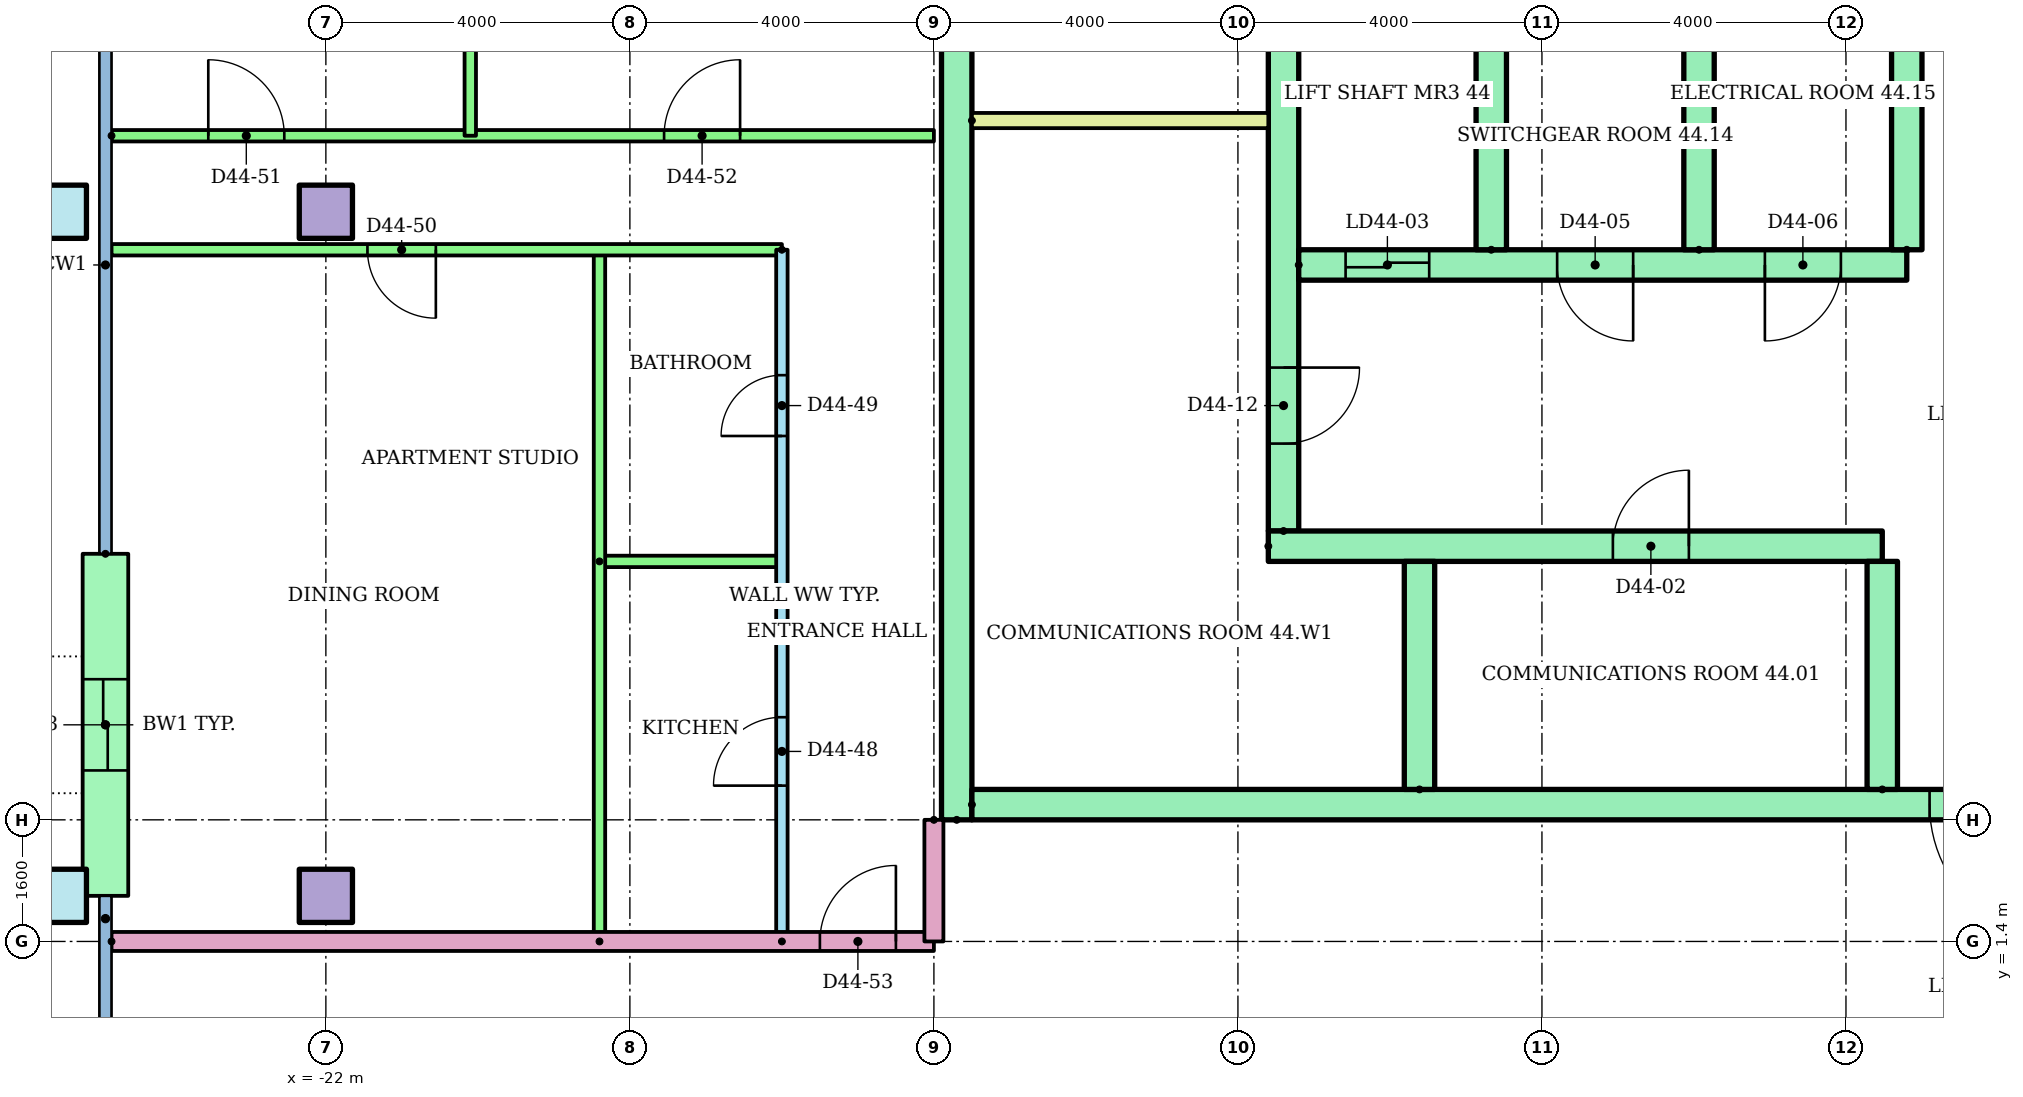
"""IFC4 building model, lengths in metres.
Left out: names, types, materials, properties, quantities, classifications, styles, units other than length and angle.
Written with IfcOpenShell. Run it as: python <this file> out.ifc"""

import sys

from ifc_helpers import new_model, si_unit, direction, frame, frame_2d, origin, origin_2d, place, context, subcontext, project, spatial, rectangle, hollow_rectangle, extrude, element, fill, save


model = new_model("IFC4")
c1 = context("Model", 3, precision=1e-05, world=origin(), true_north=direction((0.0, 1.0)))
c2 = subcontext(c1, "Body", "Model", "MODEL_VIEW")
j1 = project(units=[si_unit("LENGTHUNIT", "METRE"), si_unit("PLANEANGLEUNIT", "RADIAN")], contexts=[c1])
p1 = place(None, origin())
s1 = spatial("IfcSite", under=j1, at=p1, CompositionType="ELEMENT")
p2 = place(p1, origin())
s2 = spatial("IfcBuilding", under=s1, at=p2, CompositionType="ELEMENT")
p3 = place(p2, frame((0.0, 0.0, 171.7)))
s3 = spatial("IfcBuildingStorey", under=s2, at=p3, CompositionType="ELEMENT", Elevation=171.7)
p4 = place(p3, frame((-25.5, 2.0, 0.0)))
e1 = element("IfcColumn", 1, at=p4, inside=s3, PredefinedType="COLUMN", context=c2, shape_type="SweptSolid", body=[
    extrude(hollow_rectangle(XDim=0.7, YDim=0.7, WallThickness=0.036, at=origin_2d()), origin(), (0.0, 0.0, 1.0), 3.2),
])
p5 = place(p3, frame((-22.0, 2.0, 0.0)))
e2 = element("IfcColumn", 2, at=p5, inside=s3, PredefinedType="COLUMN", context=c2, shape_type="SweptSolid", body=[
    extrude(rectangle(XDim=0.7, YDim=0.7, at=origin_2d()), origin(), (0.0, 0.0, 1.0), 3.2),
])
p6 = place(p3, frame((-25.5, 11.0, 0.0)))
e3 = element("IfcColumn", 3, at=p6, inside=s3, PredefinedType="COLUMN", context=c2, shape_type="SweptSolid", body=[
    extrude(hollow_rectangle(XDim=0.7, YDim=0.7, WallThickness=0.036, at=origin_2d()), origin(), (0.0, 0.0, 1.0), 3.2),
])
p7 = place(p3, frame((-22.0, 11.0, 0.0)))
e4 = element("IfcColumn", 4, at=p7, inside=s3, PredefinedType="COLUMN", context=c2, shape_type="SweptSolid", body=[
    extrude(rectangle(XDim=0.7, YDim=0.7, at=origin_2d()), origin(), (0.0, 0.0, 1.0), 3.2),
])
p8 = place(p3, frame((-24.9, 6.5, 0.0), z_axis=(0.0, 0.0, 1.0), x_axis=(0.0, -1.0, 0.0)))
e5 = element("IfcWall", 5, at=p8, inside=s3, PredefinedType="STANDARD", context=c2, shape_type="SweptSolid", body=[
    extrude(rectangle(XDim=4.5, YDim=0.6, at=frame_2d((2.25, 0.0))), origin(), (0.0, 0.0, 1.0), 2.92),
])
p9 = place(p8, frame((1.65, 0.0, 0.0)))
e6 = element("IfcOpeningElement", 6, at=p9, cuts=e5, PredefinedType="OPENING", context=c2, shape_type="SweptSolid", body=[
    extrude(rectangle(XDim=1.2, YDim=2.1, at=frame_2d((0.6, 1.05))), frame((0.0, 0.31, 0.0), z_axis=(0.0, -1.0, 0.0), x_axis=(1.0, 0.0, 0.0)), (0.0, 0.0, 1.0), 0.62),
])
p10 = place(p3, frame((-13.7, 3.0, 0.0), z_axis=(0.0, 0.0, 1.0), x_axis=(0.0, 1.0, 0.0)))
e7 = element("IfcWall", 7, at=p10, inside=s3, PredefinedType="SHEAR", context=c2, shape_type="SweptSolid", body=[
    extrude(rectangle(XDim=17.0, YDim=0.4, at=frame_2d((8.5, 0.0))), origin(), (0.0, 0.0, 1.0), 2.92),
])
p11 = place(p3, frame((-9.4, 6.8, 0.0), z_axis=(0.0, 0.0, 1.0), x_axis=(0.0, 1.0, 0.0)))
e8 = element("IfcWall", 8, at=p11, inside=s3, PredefinedType="SHEAR", context=c2, shape_type="SweptSolid", body=[
    extrude(rectangle(XDim=12.7, YDim=0.4, at=frame_2d((6.35, 0.0))), origin(), (0.0, 0.0, 1.0), 2.92),
])
p12 = place(p11, frame((1.15, 0.0, 0.0)))
e9 = element("IfcOpeningElement", 9, at=p12, cuts=e8, PredefinedType="OPENING", context=c2, shape_type="SweptSolid", body=[
    extrude(rectangle(XDim=1.0, YDim=2.1, at=frame_2d((0.5, 1.05))), frame((0.0, 0.21, 0.0), z_axis=(0.0, -1.0, 0.0), x_axis=(1.0, 0.0, 0.0)), (0.0, 0.0, 1.0), 0.42),
])
p13 = place(p11, frame((7.925, 0.0, 0.0)))
e10 = element("IfcOpeningElement", 10, at=p13, cuts=e8, PredefinedType="OPENING", context=c2, shape_type="SweptSolid", body=[
    extrude(rectangle(XDim=1.0, YDim=2.1, at=frame_2d((0.5, 1.05))), frame((0.0, 0.21, 0.0), z_axis=(0.0, -1.0, 0.0), x_axis=(1.0, 0.0, 0.0)), (0.0, 0.0, 1.0), 0.42),
])
p14 = place(p3, frame((-13.5, 3.2, 0.0)))
e11 = element("IfcWall", 11, at=p14, inside=s3, PredefinedType="SHEAR", context=c2, shape_type="SweptSolid", body=[
    extrude(rectangle(XDim=27.0, YDim=0.4, at=frame_2d((13.5, 0.0))), origin(), (0.0, 0.0, 1.0), 2.92),
])
p15 = place(p14, frame((22.083, 0.0, 0.0)))
e12 = element("IfcOpeningElement", 12, at=p15, cuts=e11, PredefinedType="OPENING", context=c2, shape_type="SweptSolid", body=[
    extrude(rectangle(XDim=1.1, YDim=2.1, at=frame_2d((0.55, 1.05))), frame((0.0, 0.21, 0.0), z_axis=(0.0, -1.0, 0.0), x_axis=(1.0, 0.0, 0.0)), (0.0, 0.0, 1.0), 0.42),
])
p16 = place(p14, frame((25.128, 0.0, 0.0)))
e13 = element("IfcOpeningElement", 13, at=p16, cuts=e11, PredefinedType="OPENING", context=c2, shape_type="SweptSolid", body=[
    extrude(rectangle(XDim=1.1, YDim=2.1, at=frame_2d((0.55, 1.05))), frame((0.0, 0.21, 0.0), z_axis=(0.0, -1.0, 0.0), x_axis=(1.0, 0.0, 0.0)), (0.0, 0.0, 1.0), 0.42),
])
p17 = place(p14, frame((12.6, 0.0, 0.0)))
e14 = element("IfcOpeningElement", 14, at=p17, cuts=e11, PredefinedType="OPENING", context=c2, shape_type="SweptSolid", body=[
    extrude(rectangle(XDim=1.8, YDim=2.1, at=frame_2d((0.9, 1.05))), frame((0.0, 0.21, 0.0), z_axis=(0.0, -1.0, 0.0), x_axis=(1.0, 0.0, 0.0)), (0.0, 0.0, 1.0), 0.42),
])
p18 = place(p3, frame((-9.6, 6.6, 0.0)))
e15 = element("IfcWall", 15, at=p18, inside=s3, PredefinedType="SHEAR", context=c2, shape_type="SweptSolid", body=[
    extrude(rectangle(XDim=8.078, YDim=0.4, at=frame_2d((4.039, 0.0))), origin(), (0.0, 0.0, 1.0), 2.92),
])
p19 = place(p18, frame((4.533, 0.0, 0.0)))
e16 = element("IfcOpeningElement", 16, at=p19, cuts=e15, PredefinedType="OPENING", context=c2, shape_type="SweptSolid", body=[
    extrude(rectangle(XDim=1.0, YDim=2.1, at=frame_2d((0.5, 1.05))), frame((0.0, 0.21, 0.0), z_axis=(0.0, -1.0, 0.0), x_axis=(1.0, 0.0, 0.0)), (0.0, 0.0, 1.0), 0.42),
])
for number, where, z_axis, x_axis in (
    (17, (-7.611, 3.4, 0.0), (0.0, 0.0, 1.0), (0.0, 1.0, 0.0)),
    (18, (-1.522, 3.4, 0.0), (0.0, 0.0, 1.0), (0.0, 1.0, 0.0)),
):
    element("IfcWall", number, at=place(p3, frame(where, z_axis=z_axis, x_axis=x_axis)), inside=s3, PredefinedType="SHEAR", context=c2, shape_type="SweptSolid", body=[
        extrude(rectangle(XDim=3.0, YDim=0.4, at=frame_2d((1.5, 0.0))), origin(), (0.0, 0.0, 1.0), 2.92),
    ])
p20 = place(p3, frame((-9.2, 10.3, 0.0)))
e19 = element("IfcWall", 19, at=p20, inside=s3, PredefinedType="SHEAR", context=c2, shape_type="SweptSolid", body=[
    extrude(rectangle(XDim=8.0, YDim=0.4, at=frame_2d((4.0, 0.0))), origin(), (0.0, 0.0, 1.0), 2.92),
])
p21 = place(p20, frame((0.617, 0.0, 0.0)))
e20 = element("IfcOpeningElement", 20, at=p21, cuts=e19, PredefinedType="OPENING", context=c2, shape_type="SweptSolid", body=[
    extrude(rectangle(XDim=1.1, YDim=2.1, at=frame_2d((0.55, 1.05))), frame((0.0, 0.21, 0.0), z_axis=(0.0, -1.0, 0.0), x_axis=(1.0, 0.0, 0.0)), (0.0, 0.0, 1.0), 0.42),
])
p22 = place(p20, frame((3.4, 0.0, 0.0)))
e21 = element("IfcOpeningElement", 21, at=p22, cuts=e19, PredefinedType="OPENING", context=c2, shape_type="SweptSolid", body=[
    extrude(rectangle(XDim=1.0, YDim=2.1, at=frame_2d((0.5, 1.05))), frame((0.0, 0.21, 0.0), z_axis=(0.0, -1.0, 0.0), x_axis=(1.0, 0.0, 0.0)), (0.0, 0.0, 1.0), 0.42),
])
p23 = place(p20, frame((6.133, 0.0, 0.0)))
e22 = element("IfcOpeningElement", 22, at=p23, cuts=e19, PredefinedType="OPENING", context=c2, shape_type="SweptSolid", body=[
    extrude(rectangle(XDim=1.0, YDim=2.1, at=frame_2d((0.5, 1.05))), frame((0.0, 0.21, 0.0), z_axis=(0.0, -1.0, 0.0), x_axis=(1.0, 0.0, 0.0)), (0.0, 0.0, 1.0), 0.42),
])
for number, where, z_axis, x_axis in (
    (23, (-6.667, 10.5, 0.0), (0.0, 0.0, 1.0), (0.0, 1.0, 0.0)),
    (24, (-3.933, 10.5, 0.0), (0.0, 0.0, 1.0), (0.0, 1.0, 0.0)),
    (25, (-1.2, 10.5, 0.0), (0.0, 0.0, 1.0), (0.0, 1.0, 0.0)),
):
    element("IfcWall", number, at=place(p3, frame(where, z_axis=z_axis, x_axis=x_axis)), inside=s3, PredefinedType="SHEAR", context=c2, shape_type="SweptSolid", body=[
        extrude(rectangle(XDim=3.0, YDim=0.4, at=frame_2d((1.5, 0.0))), origin(), (0.0, 0.0, 1.0), 2.92),
    ])
p24 = place(p3, frame((-13.5, 12.2, 0.0)))
e26 = element("IfcWall", 26, at=p24, inside=s3, PredefinedType="PARTITIONING", context=c2, shape_type="SweptSolid", body=[
    extrude(rectangle(XDim=3.9, YDim=0.2, at=frame_2d((1.95, 0.0))), origin(), (0.0, 0.0, 1.0), 2.92),
])
p25 = place(p3, frame((-16.0, 1.4, 0.0), z_axis=(0.0, 0.0, 1.0), x_axis=(0.0, 1.0, 0.0)))
e27 = element("IfcWall", 27, at=p25, inside=s3, PredefinedType="PARTITIONING", context=c2, shape_type="SweptSolid", body=[
    extrude(rectangle(XDim=9.1, YDim=0.15, at=frame_2d((4.55, 0.0))), origin(), (0.0, 0.0, 1.0), 2.4),
])
p26 = place(p25, frame((2.05, 0.0, 0.0)))
e28 = element("IfcOpeningElement", 28, at=p26, cuts=e27, PredefinedType="OPENING", context=c2, shape_type="SweptSolid", body=[
    extrude(rectangle(XDim=0.9, YDim=2.1, at=frame_2d((0.45, 1.05))), frame((0.0, 0.085, 0.0), z_axis=(0.0, -1.0, 0.0), x_axis=(1.0, 0.0, 0.0)), (0.0, 0.0, 1.0), 0.17),
])
p27 = place(p25, frame((6.65, 0.0, 0.0)))
e29 = element("IfcOpeningElement", 29, at=p27, cuts=e27, PredefinedType="OPENING", context=c2, shape_type="SweptSolid", body=[
    extrude(rectangle(XDim=0.8, YDim=2.1, at=frame_2d((0.4, 1.05))), frame((0.0, 0.085, 0.0), z_axis=(0.0, -1.0, 0.0), x_axis=(1.0, 0.0, 0.0)), (0.0, 0.0, 1.0), 0.17),
])
p28 = place(p3, frame((-18.4, 6.4, 0.0)))
e30 = element("IfcWall", 30, at=p28, inside=s3, PredefinedType="PARTITIONING", context=c2, shape_type="SweptSolid", body=[
    extrude(rectangle(XDim=2.4, YDim=0.15, at=frame_2d((1.2, 0.0))), origin(), (0.0, 0.0, 1.0), 2.4),
])
p29 = place(p3, frame((-18.4, 1.4, 0.0), z_axis=(0.0, 0.0, 1.0), x_axis=(0.0, 1.0, 0.0)))
e31 = element("IfcWall", 31, at=p29, inside=s3, PredefinedType="PARTITIONING", context=c2, shape_type="SweptSolid", body=[
    extrude(rectangle(XDim=9.1, YDim=0.15, at=frame_2d((4.55, 0.0))), origin(), (0.0, 0.0, 1.0), 2.4),
])
p30 = place(p3, frame((-16.0, 10.5, 0.0), z_axis=(0.0, 0.0, 1.0), x_axis=(-1.0, 0.0, 0.0)))
e32 = element("IfcWall", 32, at=p30, inside=s3, PredefinedType="PARTITIONING", context=c2, shape_type="SweptSolid", body=[
    extrude(rectangle(XDim=8.82, YDim=0.15, at=frame_2d((4.41, 0.0))), origin(), (0.0, 0.0, 1.0), 2.4),
])
p31 = place(p30, frame((4.553, 0.0, 0.0)))
e33 = element("IfcOpeningElement", 33, at=p31, cuts=e32, PredefinedType="OPENING", context=c2, shape_type="SweptSolid", body=[
    extrude(rectangle(XDim=0.9, YDim=2.1, at=frame_2d((0.45, 1.05))), frame((0.0, 0.085, 0.0), z_axis=(0.0, -1.0, 0.0), x_axis=(1.0, 0.0, 0.0)), (0.0, 0.0, 1.0), 0.17),
])
p32 = place(p3, frame((-24.82, 12.0, 0.0)))
e34 = element("IfcWall", 34, at=p32, inside=s3, PredefinedType="PARTITIONING", context=c2, shape_type="SweptSolid", body=[
    extrude(rectangle(XDim=10.82, YDim=0.15, at=frame_2d((5.41, 0.0))), origin(), (0.0, 0.0, 1.0), 2.4),
])
p33 = place(p32, frame((1.273, 0.0, 0.0)))
e35 = element("IfcOpeningElement", 35, at=p33, cuts=e34, PredefinedType="OPENING", context=c2, shape_type="SweptSolid", body=[
    extrude(rectangle(XDim=1.0, YDim=2.1, at=frame_2d((0.5, 1.05))), frame((0.0, 0.085, 0.0), z_axis=(0.0, -1.0, 0.0), x_axis=(1.0, 0.0, 0.0)), (0.0, 0.0, 1.0), 0.17),
])
p34 = place(p32, frame((7.27, 0.0, 0.0)))
e36 = element("IfcOpeningElement", 36, at=p34, cuts=e34, PredefinedType="OPENING", context=c2, shape_type="SweptSolid", body=[
    extrude(rectangle(XDim=1.0, YDim=2.1, at=frame_2d((0.5, 1.05))), frame((0.0, 0.085, 0.0), z_axis=(0.0, -1.0, 0.0), x_axis=(1.0, 0.0, 0.0)), (0.0, 0.0, 1.0), 0.17),
])
p35 = place(p3, frame((-20.1, 17.02, 0.0), z_axis=(0.0, 0.0, 1.0), x_axis=(0.0, -1.0, 0.0)))
e37 = element("IfcWall", 37, at=p35, inside=s3, PredefinedType="PARTITIONING", context=c2, shape_type="SweptSolid", body=[
    extrude(rectangle(XDim=5.02, YDim=0.15, at=frame_2d((2.51, 0.0))), origin(), (0.0, 0.0, 1.0), 2.4),
])
p36 = place(p3, frame((-24.82, 1.4, 0.0)))
e38 = element("IfcWall", 38, at=p36, inside=s3, PredefinedType="PARTITIONING", context=c2, shape_type="SweptSolid", body=[
    extrude(rectangle(XDim=10.82, YDim=0.25, at=frame_2d((5.41, 0.0))), origin(), (0.0, 0.0, 1.0), 2.4),
])
p37 = place(p36, frame((9.32, 0.0, 0.0)))
e39 = element("IfcOpeningElement", 39, at=p37, cuts=e38, PredefinedType="OPENING", context=c2, shape_type="SweptSolid", body=[
    extrude(rectangle(XDim=1.0, YDim=2.1, at=frame_2d((0.5, 1.05))), frame((0.0, 0.135, 0.0), z_axis=(0.0, -1.0, 0.0), x_axis=(1.0, 0.0, 0.0)), (0.0, 0.0, 1.0), 0.27),
])
p38 = place(p3, frame((-14.0, 3.0, 0.0), z_axis=(0.0, 0.0, 1.0), x_axis=(0.0, -1.0, 0.0)))
e40 = element("IfcWall", 40, at=p38, inside=s3, PredefinedType="PARTITIONING", context=c2, shape_type="SweptSolid", body=[
    extrude(rectangle(XDim=1.6, YDim=0.25, at=frame_2d((0.8, 0.0))), origin(), (0.0, 0.0, 1.0), 2.4),
])
p39 = place(p17, frame((1.8, 0.0, 0.0), z_axis=(0.0, 0.0, 1.0), x_axis=(-1.0, 0.0, 0.0)))
e41 = element("IfcDoor", 41, at=p39, inside=s3, OperationType="DOUBLE_DOOR_SINGLE_SWING", PredefinedType="DOOR", context=c2, shape_type="SweptSolid", body=[
    extrude(rectangle(XDim=1.8, YDim=2.1, at=frame_2d((0.9, 1.05))), frame((0.0, 0.025, 0.0), z_axis=(0.0, -1.0, 0.0), x_axis=(1.0, 0.0, 0.0)), (0.0, 0.0, 1.0), 0.05),
])
fill(e14, e41)
p40 = place(p19, origin())
e42 = element("IfcDoor", 42, at=p40, inside=s3, OperationType="SINGLE_SWING_RIGHT", PredefinedType="DOOR", context=c2, shape_type="SweptSolid", body=[
    extrude(rectangle(XDim=1.0, YDim=2.1, at=frame_2d((0.5, 1.05))), frame((0.0, 0.025, 0.0), z_axis=(0.0, -1.0, 0.0), x_axis=(1.0, 0.0, 0.0)), (0.0, 0.0, 1.0), 0.05),
])
fill(e16, e42)
p41 = place(p21, origin())
e43 = element("IfcDoor", 43, at=p41, inside=s3, OperationType="SLIDING_TO_LEFT", PredefinedType="DOOR", context=c2, shape_type="SweptSolid", body=[
    extrude(rectangle(XDim=1.1, YDim=2.1, at=frame_2d((0.55, 1.05))), frame((0.0, 0.025, 0.0), z_axis=(0.0, -1.0, 0.0), x_axis=(1.0, 0.0, 0.0)), (0.0, 0.0, 1.0), 0.05),
])
fill(e20, e43)
p42 = place(p22, frame((1.0, 0.0, 0.0), z_axis=(0.0, 0.0, 1.0), x_axis=(-1.0, 0.0, 0.0)))
e44 = element("IfcDoor", 44, at=p42, inside=s3, OperationType="SINGLE_SWING_RIGHT", PredefinedType="DOOR", context=c2, shape_type="SweptSolid", body=[
    extrude(rectangle(XDim=1.0, YDim=2.1, at=frame_2d((0.5, 1.05))), frame((0.0, 0.025, 0.0), z_axis=(0.0, -1.0, 0.0), x_axis=(1.0, 0.0, 0.0)), (0.0, 0.0, 1.0), 0.05),
])
fill(e21, e44)
p43 = place(p23, frame((1.0, 0.0, 0.0), z_axis=(0.0, 0.0, 1.0), x_axis=(-1.0, 0.0, 0.0)))
e45 = element("IfcDoor", 45, at=p43, inside=s3, OperationType="SINGLE_SWING_LEFT", PredefinedType="DOOR", context=c2, shape_type="SweptSolid", body=[
    extrude(rectangle(XDim=1.0, YDim=2.1, at=frame_2d((0.5, 1.05))), frame((0.0, 0.025, 0.0), z_axis=(0.0, -1.0, 0.0), x_axis=(1.0, 0.0, 0.0)), (0.0, 0.0, 1.0), 0.05),
])
fill(e22, e45)
p44 = place(p12, frame((1.0, 0.0, 0.0), z_axis=(0.0, 0.0, 1.0), x_axis=(-1.0, 0.0, 0.0)))
e46 = element("IfcDoor", 46, at=p44, inside=s3, OperationType="SINGLE_SWING_RIGHT", PredefinedType="DOOR", context=c2, shape_type="SweptSolid", body=[
    extrude(rectangle(XDim=1.0, YDim=2.1, at=frame_2d((0.5, 1.05))), frame((0.0, 0.025, 0.0), z_axis=(0.0, -1.0, 0.0), x_axis=(1.0, 0.0, 0.0)), (0.0, 0.0, 1.0), 0.05),
])
fill(e9, e46)
p45 = place(p26, origin())
e47 = element("IfcDoor", 47, at=p45, inside=s3, OperationType="SINGLE_SWING_LEFT", PredefinedType="DOOR", context=c2, shape_type="SweptSolid", body=[
    extrude(rectangle(XDim=0.9, YDim=2.1, at=frame_2d((0.45, 1.05))), frame((0.0, 0.025, 0.0), z_axis=(0.0, -1.0, 0.0), x_axis=(1.0, 0.0, 0.0)), (0.0, 0.0, 1.0), 0.05),
])
fill(e28, e47)
p46 = place(p27, origin())
e48 = element("IfcDoor", 48, at=p46, inside=s3, OperationType="SINGLE_SWING_LEFT", PredefinedType="DOOR", context=c2, shape_type="SweptSolid", body=[
    extrude(rectangle(XDim=0.8, YDim=2.1, at=frame_2d((0.4, 1.05))), frame((0.0, 0.025, 0.0), z_axis=(0.0, -1.0, 0.0), x_axis=(1.0, 0.0, 0.0)), (0.0, 0.0, 1.0), 0.05),
])
fill(e29, e48)
p47 = place(p31, origin())
e49 = element("IfcDoor", 49, at=p47, inside=s3, OperationType="SINGLE_SWING_LEFT", PredefinedType="DOOR", context=c2, shape_type="SweptSolid", body=[
    extrude(rectangle(XDim=0.9, YDim=2.1, at=frame_2d((0.45, 1.05))), frame((0.0, 0.025, 0.0), z_axis=(0.0, -1.0, 0.0), x_axis=(1.0, 0.0, 0.0)), (0.0, 0.0, 1.0), 0.05),
])
fill(e33, e49)
p48 = place(p33, origin())
e50 = element("IfcDoor", 50, at=p48, inside=s3, OperationType="SINGLE_SWING_LEFT", PredefinedType="DOOR", context=c2, shape_type="SweptSolid", body=[
    extrude(rectangle(XDim=1.0, YDim=2.1, at=frame_2d((0.5, 1.05))), frame((0.0, 0.025, 0.0), z_axis=(0.0, -1.0, 0.0), x_axis=(1.0, 0.0, 0.0)), (0.0, 0.0, 1.0), 0.05),
])
fill(e35, e50)
p49 = place(p34, origin())
e51 = element("IfcDoor", 51, at=p49, inside=s3, OperationType="SINGLE_SWING_RIGHT", PredefinedType="DOOR", context=c2, shape_type="SweptSolid", body=[
    extrude(rectangle(XDim=1.0, YDim=2.1, at=frame_2d((0.5, 1.05))), frame((0.0, 0.025, 0.0), z_axis=(0.0, -1.0, 0.0), x_axis=(1.0, 0.0, 0.0)), (0.0, 0.0, 1.0), 0.05),
])
fill(e36, e51)
p50 = place(p37, origin())
e52 = element("IfcDoor", 52, at=p50, inside=s3, OperationType="SINGLE_SWING_RIGHT", PredefinedType="DOOR", context=c2, shape_type="SweptSolid", body=[
    extrude(rectangle(XDim=1.0, YDim=2.1, at=frame_2d((0.5, 1.05))), frame((0.0, 0.025, 0.0), z_axis=(0.0, -1.0, 0.0), x_axis=(1.0, 0.0, 0.0)), (0.0, 0.0, 1.0), 0.05),
])
fill(e39, e52)
p51 = place(p9, origin())
e53 = element("IfcDoor", 53, at=p51, inside=s3, OperationType="SLIDING_TO_LEFT", PredefinedType="DOOR", context=c2, shape_type="SweptSolid", body=[
    extrude(rectangle(XDim=1.2, YDim=2.1, at=frame_2d((0.6, 1.05))), frame((0.0, 0.025, 0.0), z_axis=(0.0, -1.0, 0.0), x_axis=(1.0, 0.0, 0.0)), (0.0, 0.0, 1.0), 0.05),
])
fill(e6, e53)
save(model, sys.argv[1])
